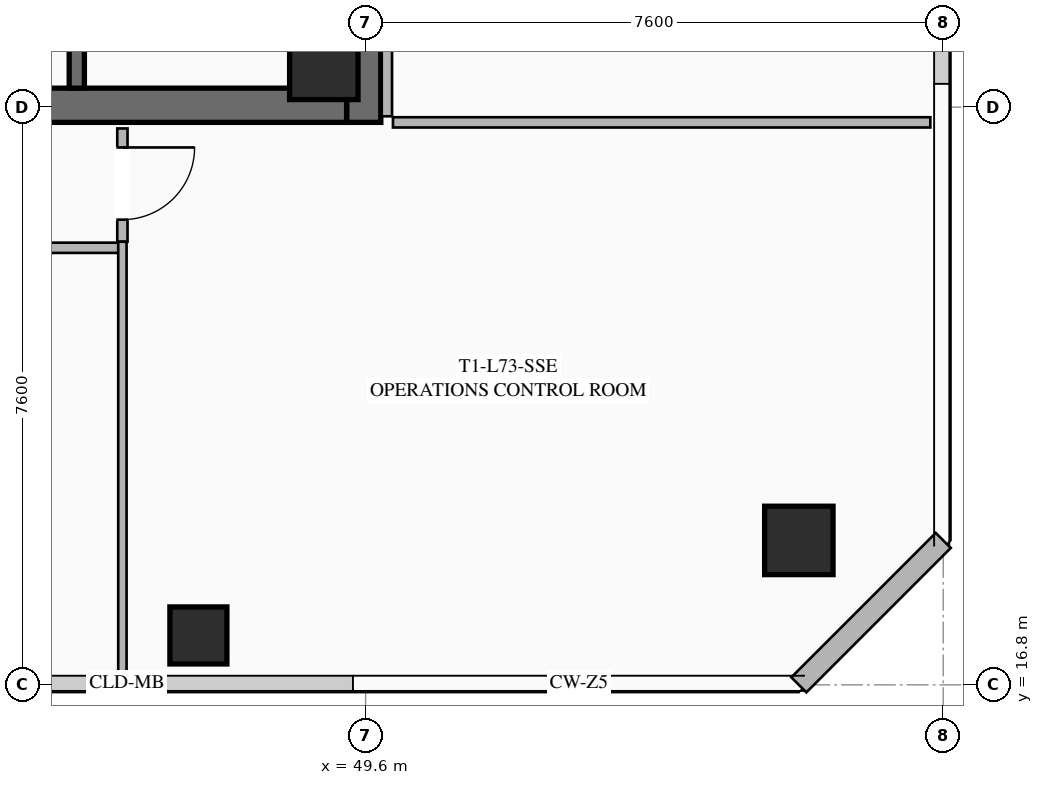
"""IFC4 building model, lengths in metres.
Left out: names, types, materials, properties, quantities, classifications, styles, units other than length and angle.
Written with IfcOpenShell. Run it as: python <this file> out.ifc"""

import sys

from ifc_helpers import new_model, si_unit, direction, frame, frame_2d, origin, origin_2d, place, context, subcontext, project, spatial, rectangle, hollow_rectangle, extrude, element, fill, save


model = new_model("IFC4")
c1 = context("Model", 3, precision=1e-05, world=origin(), true_north=direction((0.0, 1.0)))
c2 = subcontext(c1, "Body", "Model", "MODEL_VIEW")
j1 = project(units=[si_unit("LENGTHUNIT", "METRE"), si_unit("PLANEANGLEUNIT", "RADIAN")], contexts=[c1])
p1 = place(None, origin())
s1 = spatial("IfcSite", under=j1, at=p1, CompositionType="ELEMENT")
p2 = place(p1, origin())
s2 = spatial("IfcBuilding", under=s1, at=p2, CompositionType="ELEMENT")
p3 = place(p2, frame((0.0, 0.0, 270.5)))
s3 = spatial("IfcBuildingStorey", under=s2, at=p3, CompositionType="ELEMENT", Elevation=270.5)
p4 = place(p3, frame((49.575, 39.8, 0.0), z_axis=(0.0, 0.0, 1.0), x_axis=(0.0, -1.0, 0.0)))
e1 = element("IfcWall", 1, at=p4, inside=s3, PredefinedType="SHEAR", context=c2, shape_type="SweptSolid", body=[
    extrude(rectangle(XDim=15.6, YDim=0.45, at=frame_2d((7.8, 0.0))), origin(), (0.0, 0.0, 1.0), 3.55),
])
p5 = place(p3, frame((49.35, 24.425, 0.0), z_axis=(0.0, 0.0, 1.0), x_axis=(-1.0, 0.0, 0.0)))
e2 = element("IfcWall", 2, at=p5, inside=s3, PredefinedType="SHEAR", context=c2, shape_type="SweptSolid", body=[
    extrude(rectangle(XDim=14.7, YDim=0.45, at=frame_2d((7.35, 0.0))), origin(), (0.0, 0.0, 1.0), 3.55),
])
p6 = place(p5, frame((9.05, 0.0, 0.0)))
e3 = element("IfcOpeningElement", 3, at=p6, cuts=e2, PredefinedType="OPENING", context=c2, shape_type="SweptSolid", body=[
    extrude(rectangle(XDim=1.25, YDim=2.25, at=frame_2d((0.625, 1.125))), frame((0.0, 0.235, 0.0), z_axis=(0.0, -1.0, 0.0), x_axis=(1.0, 0.0, 0.0)), (0.0, 0.0, 1.0), 0.47),
])
p7 = place(p5, frame((4.0, 0.0, 0.0)))
e4 = element("IfcOpeningElement", 4, at=p7, cuts=e2, PredefinedType="OPENING", context=c2, shape_type="SweptSolid", body=[
    extrude(rectangle(XDim=1.25, YDim=2.25, at=frame_2d((0.625, 1.125))), frame((0.0, 0.235, 0.0), z_axis=(0.0, -1.0, 0.0), x_axis=(1.0, 0.0, 0.0)), (0.0, 0.0, 1.0), 0.47),
])
for number, where, z_axis, x_axis in (
    (5, (49.05, 24.95, 0.0), (0.0, 0.0, 1.0), (1.0, 0.0, 0.0)),
    (6, (55.3, 18.7, 0.0), (0.0, 0.0, 1.0), (1.0, 0.0, 0.0)),
):
    element("IfcColumn", number, at=place(p3, frame(where, z_axis=z_axis, x_axis=x_axis)), inside=s3, PredefinedType="COLUMN", context=c2, shape_type="SweptSolid", body=[
        extrude(hollow_rectangle(XDim=0.9, YDim=0.9, WallThickness=0.04, at=origin_2d()), origin(), (0.0, 0.0, 1.0), 3.37),
    ])
p8 = place(p3, frame((47.4, 17.45, 0.0), z_axis=(0.0, 0.0, 1.0), x_axis=(1.0, 0.0, 0.0)))
e7 = element("IfcColumn", 7, at=p8, inside=s3, PredefinedType="COLUMN", context=c2, shape_type="SweptSolid", body=[
    extrude(hollow_rectangle(XDim=0.75, YDim=0.75, WallThickness=0.032, at=origin_2d()), origin(), (0.0, 0.0, 1.0), 3.37),
])
p9 = place(p3, frame((57.2, 18.7, 0.0), z_axis=(0.0, 0.0, 1.0), x_axis=(-0.707106781187, -0.707106781187, 0.0)))
e8 = element("IfcWall", 8, at=p9, inside=s3, PredefinedType="SOLIDWALL", context=c2, shape_type="SweptSolid", body=[
    extrude(rectangle(XDim=2.687, YDim=0.28, at=frame_2d((1.343, 0.0))), origin(), (0.0, 0.0, 1.0), 3.37),
])
p10 = place(p3, frame((45.8, 32.8, 0.0), z_axis=(0.0, 0.0, 1.0), x_axis=(0.0, -1.0, 0.0)))
e9 = element("IfcWall", 9, at=p10, inside=s3, PredefinedType="SHEAR", context=c2, shape_type="SweptSolid", body=[
    extrude(rectangle(XDim=8.15, YDim=0.2, at=frame_2d((4.075, 0.0))), origin(), (0.0, 0.0, 1.0), 3.37),
])
p11 = place(p10, frame((0.45, 0.0, 0.0)))
e10 = element("IfcOpeningElement", 10, at=p11, cuts=e9, PredefinedType="OPENING", context=c2, shape_type="SweptSolid", body=[
    extrude(rectangle(XDim=1.15, YDim=2.2, at=frame_2d((0.575, 1.1))), frame((0.0, 0.11, 0.0), z_axis=(0.0, -1.0, 0.0), x_axis=(1.0, 0.0, 0.0)), (0.0, 0.0, 1.0), 0.22),
])
p12 = place(p3, frame((46.4, 22.55, 0.0), z_axis=(0.0, 0.0, 1.0), x_axis=(-1.0, 0.0, 0.0)))
e11 = element("IfcWall", 11, at=p12, inside=s3, PredefinedType="PARTITIONING", context=c2, shape_type="SweptSolid", body=[
    extrude(rectangle(XDim=17.55, YDim=0.135, at=frame_2d((8.775, 0.0))), origin(), (0.0, 0.0, 1.0), 2.723),
])
p13 = place(p12, frame((16.22, 0.0, 0.0)))
e12 = element("IfcOpeningElement", 12, at=p13, cuts=e11, PredefinedType="OPENING", context=c2, shape_type="SweptSolid", body=[
    extrude(rectangle(XDim=0.95, YDim=2.05, at=frame_2d((0.475, 1.025))), frame((0.0, 0.077, 0.0), z_axis=(0.0, -1.0, 0.0), x_axis=(1.0, 0.0, 0.0)), (0.0, 0.0, 1.0), 0.155),
])
p14 = place(p3, frame((46.4, 24.12, 0.0), z_axis=(0.0, 0.0, 1.0), x_axis=(0.0, -1.0, 0.0)))
e13 = element("IfcWall", 13, at=p14, inside=s3, PredefinedType="PARTITIONING", context=c2, shape_type="SweptSolid", body=[
    extrude(rectangle(XDim=1.49, YDim=0.135, at=frame_2d((0.745, 0.0))), origin(), (0.0, 0.0, 1.0), 2.723),
])
p15 = place(p14, frame((0.25, 0.0, 0.0)))
e14 = element("IfcOpeningElement", 14, at=p15, cuts=e13, PredefinedType="OPENING", context=c2, shape_type="SweptSolid", body=[
    extrude(rectangle(XDim=0.95, YDim=2.05, at=frame_2d((0.475, 1.025))), frame((0.0, 0.077, 0.0), z_axis=(0.0, -1.0, 0.0), x_axis=(1.0, 0.0, 0.0)), (0.0, 0.0, 1.0), 0.155),
])
p16 = place(p3, frame((46.4, 16.82, 0.0), z_axis=(0.0, 0.0, 1.0), x_axis=(0.0, 1.0, 0.0)))
e15 = element("IfcWall", 15, at=p16, inside=s3, PredefinedType="PARTITIONING", context=c2, shape_type="SweptSolid", body=[
    extrude(rectangle(XDim=5.81, YDim=0.11, at=frame_2d((2.905, 0.0))), origin(), (0.0, 0.0, 1.0), 2.723),
])
p17 = place(p3, frame((49.88, 39.72, 0.0), z_axis=(0.0, 0.0, 1.0), x_axis=(0.0, -1.0, 0.0)))
e16 = element("IfcWall", 16, at=p17, inside=s3, PredefinedType="PARTITIONING", context=c2, shape_type="SweptSolid", body=[
    extrude(rectangle(XDim=15.44, YDim=0.135, at=frame_2d((7.72, 0.0))), origin(), (0.0, 0.0, 1.0), 2.723),
])
p18 = place(p3, frame((49.96, 24.2, 0.0), z_axis=(0.0, 0.0, 1.0), x_axis=(1.0, 0.0, 0.0)))
e17 = element("IfcWall", 17, at=p18, inside=s3, PredefinedType="PARTITIONING", context=c2, shape_type="SweptSolid", body=[
    extrude(rectangle(XDim=7.07, YDim=0.135, at=frame_2d((3.535, 0.0))), origin(), (0.0, 0.0, 1.0), 2.723),
])
p19 = place(p15, origin())
e18 = element("IfcDoor", 18, at=p19, inside=s3, OperationType="SINGLE_SWING_LEFT", PredefinedType="DOOR", context=c2, shape_type="SweptSolid", body=[
    extrude(rectangle(XDim=0.95, YDim=2.05, at=frame_2d((0.475, 1.025))), frame((0.0, 0.025, 0.0), z_axis=(0.0, -1.0, 0.0), x_axis=(1.0, 0.0, 0.0)), (0.0, 0.0, 1.0), 0.05),
])
fill(e14, e18)
save(model, sys.argv[1])
